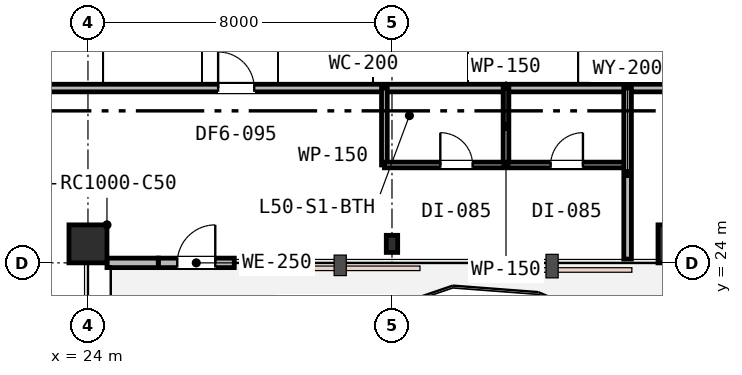
"""IFC4 building model, lengths in metres.
Left out: names, types, materials, properties, quantities, classifications, styles, units other than length and angle.
Written with IfcOpenShell. Run it as: python <this file> out.ifc"""

import sys

from ifc_helpers import new_model, si_unit, direction, frame, frame_2d, origin, origin_2d, place, context, subcontext, project, spatial, rectangle, i_section, extrude, element, fill, save


model = new_model("IFC4")
c1 = context("Model", 3, precision=1e-05, world=origin(), true_north=direction((0.0, 1.0)))
c2 = subcontext(c1, "Body", "Model", "MODEL_VIEW")
j1 = project(units=[si_unit("LENGTHUNIT", "METRE"), si_unit("PLANEANGLEUNIT", "RADIAN")], contexts=[c1])
p1 = place(None, origin())
s1 = spatial("IfcSite", under=j1, at=p1, CompositionType="ELEMENT")
p2 = place(p1, origin())
s2 = spatial("IfcBuilding", under=s1, at=p2, CompositionType="ELEMENT")
p3 = place(p2, frame((0.0, 0.0, 193.8)))
s3 = spatial("IfcBuildingStorey", under=s2, at=p3, CompositionType="ELEMENT", Elevation=193.8)
p4 = place(p3, frame((24.0, 24.5, 0.0), z_axis=(0.0, 0.0, 1.0), x_axis=(1.0, 0.0, 0.0)))
e1 = element("IfcColumn", 1, at=p4, inside=s3, PredefinedType="COLUMN", context=c2, shape_type="SweptSolid", body=[
    extrude(rectangle(XDim=1.0, YDim=1.0, at=origin_2d()), origin(), (0.0, 0.0, 1.0), 3.6),
])
p5 = place(p3, frame((32.0, 24.5, 0.0), z_axis=(0.0, 0.0, 1.0), x_axis=(1.0, 0.0, 0.0)))
e2 = element("IfcColumn", 2, at=p5, inside=s3, PredefinedType="COLUMN", context=c2, shape_type="SweptSolid", body=[
    extrude(i_section(OverallWidth=0.3, OverallDepth=0.45, WebThickness=0.014, FlangeThickness=0.026, FilletRadius=0.027, at=origin_2d()), origin(), (0.0, 0.0, 1.0), 3.6),
])
p6 = place(p3, frame((39.5, 24.5, 0.0), z_axis=(0.0, 0.0, 1.0), x_axis=(1.0, 0.0, 0.0)))
e3 = element("IfcColumn", 3, at=p6, inside=s3, PredefinedType="COLUMN", context=c2, shape_type="SweptSolid", body=[
    extrude(rectangle(XDim=1.0, YDim=1.0, at=origin_2d()), origin(), (0.0, 0.0, 1.0), 3.6),
])
p7 = place(p3, frame((25.85, 24.0, 0.0), z_axis=(0.0, 0.0, 1.0), x_axis=(1.0, 0.0, 0.0)))
e4 = element("IfcWall", 4, at=p7, inside=s3, PredefinedType="STANDARD", context=c2, shape_type="SweptSolid", body=[
    extrude(rectangle(XDim=2.0, YDim=0.25, at=frame_2d((1.0, 0.0))), origin(), (0.0, 0.0, 1.0), 3.02),
])
p8 = place(p7, frame((0.5, 0.0, 0.0)))
e5 = element("IfcOpeningElement", 5, at=p8, cuts=e4, PredefinedType="OPENING", context=c2, shape_type="SweptSolid", body=[
    extrude(rectangle(XDim=1.0, YDim=2.15, at=frame_2d((0.5, 1.075))), frame((0.0, 0.135, 0.0), z_axis=(0.0, -1.0, 0.0), x_axis=(1.0, 0.0, 0.0)), (0.0, 0.0, 1.0), 0.27),
])
p9 = place(p3, frame((24.5, 24.0, 0.0), z_axis=(0.0, 0.0, 1.0), x_axis=(1.0, 0.0, 0.0)))
e6 = element("IfcWall", 6, at=p9, inside=s3, PredefinedType="STANDARD", context=c2, shape_type="SweptSolid", body=[
    extrude(rectangle(XDim=1.35, YDim=0.25, at=frame_2d((0.675, 0.0))), origin(), (0.0, 0.0, 1.0), 3.02),
])
p10 = place(p3, frame((11.6, 28.6, 0.0), z_axis=(0.0, 0.0, 1.0), x_axis=(1.0, 0.0, 0.0)))
e7 = element("IfcWall", 7, at=p10, inside=s3, PredefinedType="PARTITIONING", context=c2, shape_type="SweptSolid", body=[
    extrude(rectangle(XDim=39.3, YDim=0.2, at=frame_2d((19.65, 0.0))), origin(), (0.0, 0.0, 1.0), 2.92),
])
p11 = place(p10, frame((15.825, 0.0, 0.0)))
e8 = element("IfcOpeningElement", 8, at=p11, cuts=e7, PredefinedType="OPENING", context=c2, shape_type="SweptSolid", body=[
    extrude(rectangle(XDim=0.95, YDim=2.15, at=frame_2d((0.475, 1.075))), frame((0.0, 0.11, 0.0), z_axis=(0.0, -1.0, 0.0), x_axis=(1.0, 0.0, 0.0)), (0.0, 0.0, 1.0), 0.22),
])
p12 = place(p10, frame((29.275, 0.0, 0.0)))
e9 = element("IfcOpeningElement", 9, at=p12, cuts=e7, PredefinedType="OPENING", context=c2, shape_type="SweptSolid", body=[
    extrude(rectangle(XDim=0.95, YDim=2.15, at=frame_2d((0.475, 1.075))), frame((0.0, 0.11, 0.0), z_axis=(0.0, -1.0, 0.0), x_axis=(1.0, 0.0, 0.0)), (0.0, 0.0, 1.0), 0.22),
])
p13 = place(p3, frame((31.8, 26.576, 0.0), z_axis=(0.0, 0.0, 1.0), x_axis=(0.0, 1.0, 0.0)))
e10 = element("IfcWall", 10, at=p13, inside=s3, PredefinedType="PARTITIONING", context=c2, shape_type="SweptSolid", body=[
    extrude(rectangle(XDim=2.024, YDim=0.15, at=frame_2d((1.012, 0.0))), origin(), (0.0, 0.0, 1.0), 2.92),
])
p14 = place(p3, frame((35.0, 26.576, 0.0), z_axis=(0.0, 0.0, 1.0), x_axis=(0.0, 1.0, 0.0)))
e11 = element("IfcWall", 11, at=p14, inside=s3, PredefinedType="PARTITIONING", context=c2, shape_type="SweptSolid", body=[
    extrude(rectangle(XDim=2.024, YDim=0.15, at=frame_2d((1.012, 0.0))), origin(), (0.0, 0.0, 1.0), 3.07),
])
p15 = place(p3, frame((31.8, 26.576, 0.0), z_axis=(0.0, 0.0, 1.0), x_axis=(1.0, 0.0, 0.0)))
e12 = element("IfcWall", 12, at=p15, inside=s3, PredefinedType="PARTITIONING", context=c2, shape_type="SweptSolid", body=[
    extrude(rectangle(XDim=6.4, YDim=0.15, at=frame_2d((3.2, 0.0))), origin(), (0.0, 0.0, 1.0), 2.92),
])
p16 = place(p15, frame((1.472, 0.0, 0.0)))
e13 = element("IfcOpeningElement", 13, at=p16, cuts=e12, PredefinedType="OPENING", context=c2, shape_type="SweptSolid", body=[
    extrude(rectangle(XDim=0.85, YDim=2.15, at=frame_2d((0.425, 1.075))), frame((0.0, 0.085, 0.0), z_axis=(0.0, -1.0, 0.0), x_axis=(1.0, 0.0, 0.0)), (0.0, 0.0, 1.0), 0.17),
])
p17 = place(p15, frame((4.375, 0.0, 0.0)))
e14 = element("IfcOpeningElement", 14, at=p17, cuts=e12, PredefinedType="OPENING", context=c2, shape_type="SweptSolid", body=[
    extrude(rectangle(XDim=0.85, YDim=2.15, at=frame_2d((0.425, 1.075))), frame((0.0, 0.085, 0.0), z_axis=(0.0, -1.0, 0.0), x_axis=(1.0, 0.0, 0.0)), (0.0, 0.0, 1.0), 0.17),
])
p18 = place(p3, frame((38.2, 24.1, 0.0), z_axis=(0.0, 0.0, 1.0), x_axis=(0.0, 1.0, 0.0)))
e15 = element("IfcWall", 15, at=p18, inside=s3, PredefinedType="PARTITIONING", context=c2, shape_type="SweptSolid", body=[
    extrude(rectangle(XDim=4.5, YDim=0.2, at=frame_2d((2.25, 0.0))), origin(), (0.0, 0.0, 1.0), 3.02),
])
p19 = place(p8, origin())
e16 = element("IfcDoor", 16, at=p19, inside=s3, OperationType="SINGLE_SWING_RIGHT", PredefinedType="DOOR", context=c2, shape_type="SweptSolid", body=[
    extrude(rectangle(XDim=1.0, YDim=2.15, at=frame_2d((0.5, 1.075))), frame((0.0, 0.025, 0.0), z_axis=(0.0, -1.0, 0.0), x_axis=(1.0, 0.0, 0.0)), (0.0, 0.0, 1.0), 0.05),
])
fill(e5, e16)
p20 = place(p11, origin())
e17 = element("IfcDoor", 17, at=p20, inside=s3, OperationType="SINGLE_SWING_LEFT", PredefinedType="DOOR", context=c2, shape_type="SweptSolid", body=[
    extrude(rectangle(XDim=0.95, YDim=2.15, at=frame_2d((0.475, 1.075))), frame((0.0, 0.025, 0.0), z_axis=(0.0, -1.0, 0.0), x_axis=(1.0, 0.0, 0.0)), (0.0, 0.0, 1.0), 0.05),
])
fill(e8, e17)
p21 = place(p16, origin())
e18 = element("IfcDoor", 18, at=p21, inside=s3, OperationType="SINGLE_SWING_LEFT", PredefinedType="DOOR", context=c2, shape_type="SweptSolid", body=[
    extrude(rectangle(XDim=0.85, YDim=2.15, at=frame_2d((0.425, 1.075))), frame((0.0, 0.025, 0.0), z_axis=(0.0, -1.0, 0.0), x_axis=(1.0, 0.0, 0.0)), (0.0, 0.0, 1.0), 0.05),
])
fill(e13, e18)
p22 = place(p17, origin())
e19 = element("IfcDoor", 19, at=p22, inside=s3, OperationType="SINGLE_SWING_RIGHT", PredefinedType="DOOR", context=c2, shape_type="SweptSolid", body=[
    extrude(rectangle(XDim=0.85, YDim=2.15, at=frame_2d((0.425, 1.075))), frame((0.0, 0.025, 0.0), z_axis=(0.0, -1.0, 0.0), x_axis=(1.0, 0.0, 0.0)), (0.0, 0.0, 1.0), 0.05),
])
fill(e14, e19)
save(model, sys.argv[1])
